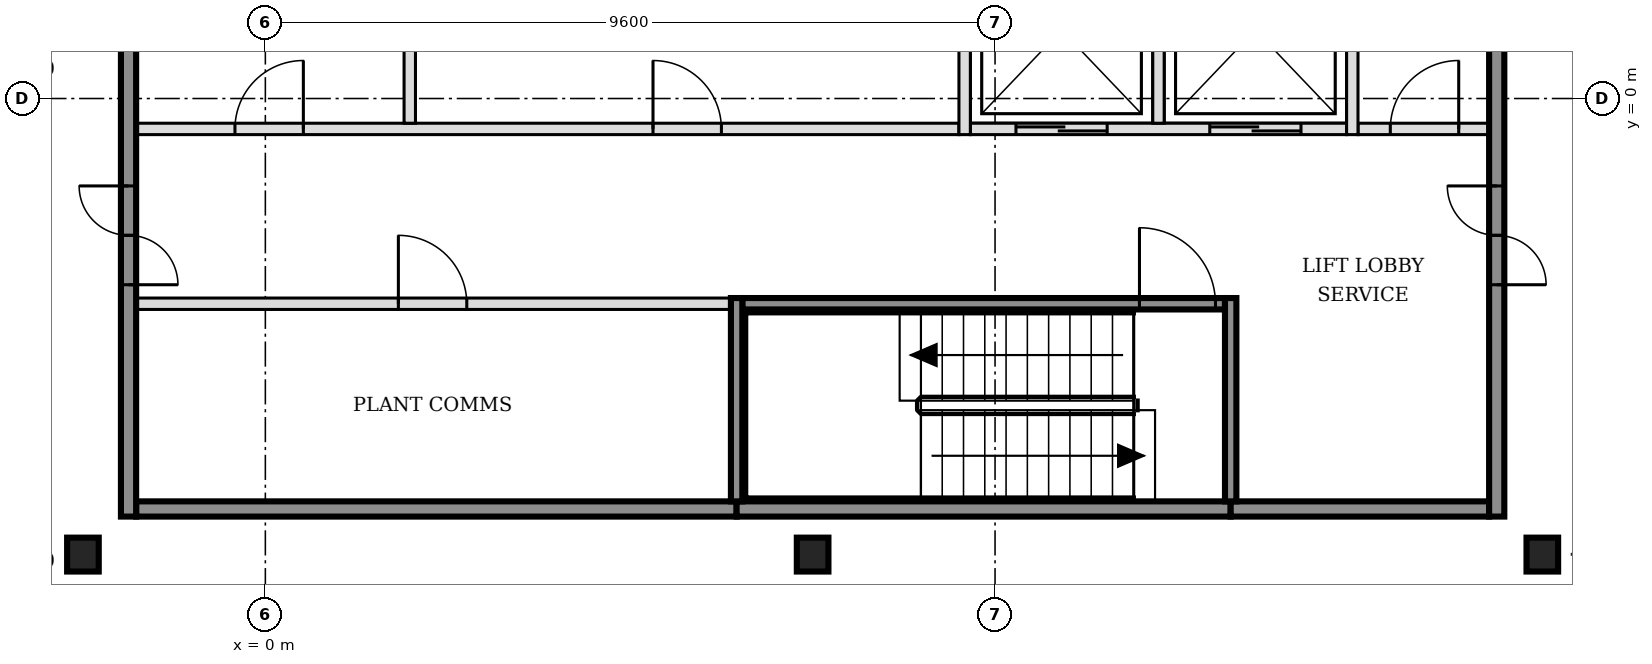
"""IFC4 building model, lengths in metres.
Left out: names, types, materials, properties, quantities, classifications, styles, units other than length and angle.
Written with IfcOpenShell. Run it as: python <this file> out.ifc"""

import sys

from ifc_helpers import new_model, si_unit, direction, frame, frame_2d, origin, origin_2d, place, context, subcontext, project, spatial, rectangle, i_section, extrude, element, fill, save


model = new_model("IFC4")
c1 = context("Model", 3, precision=1e-05, world=origin(), true_north=direction((0.0, 1.0)))
c2 = subcontext(c1, "Body", "Model", "MODEL_VIEW")
j1 = project(units=[si_unit("LENGTHUNIT", "METRE"), si_unit("PLANEANGLEUNIT", "RADIAN")], contexts=[c1])
p1 = place(None, origin())
s1 = spatial("IfcSite", under=j1, at=p1, CompositionType="ELEMENT")
p2 = place(p1, origin())
s2 = spatial("IfcBuilding", under=s1, at=p2, CompositionType="ELEMENT")
p3 = place(p2, frame((0.0, 0.0, 154.2)))
s3 = spatial("IfcBuildingStorey", under=s2, at=p3, CompositionType="ELEMENT", Elevation=154.2)
for number, where, z_axis, x_axis in (
    (1, (-2.4, -6.0, -0.15), (0.0, 0.0, 1.0), (1.0, 0.0, 0.0)),
    (2, (7.2, -6.0, -0.15), (0.0, 0.0, 1.0), (1.0, 0.0, 0.0)),
    (3, (16.8, -6.0, -0.15), (0.0, 0.0, 1.0), (1.0, 0.0, 0.0)),
):
    element("IfcColumn", number, at=place(p3, frame(where, z_axis=z_axis, x_axis=x_axis)), inside=s3, PredefinedType="COLUMN", context=c2, shape_type="SweptSolid", body=[
        extrude(i_section(OverallWidth=0.416, OverallDepth=0.446, WebThickness=0.039, FlangeThickness=0.063, FilletRadius=0.015, at=origin_2d()), origin(), (0.0, 0.0, 1.0), 3.6),
    ])
p4 = place(p3, frame((-1.7, -5.4, 0.0), z_axis=(0.0, 0.0, 1.0), x_axis=(1.0, 0.0, 0.0)))
e4 = element("IfcWall", 4, at=p4, inside=s3, PredefinedType="SOLIDWALL", context=c2, shape_type="SweptSolid", body=[
    extrude(rectangle(XDim=7.9, YDim=0.2, at=frame_2d((3.95, 0.0))), origin(), (0.0, 0.0, 1.0), 3.45),
])
p5 = place(p3, frame((6.2, -5.4, 0.0), z_axis=(0.0, 0.0, 1.0), x_axis=(1.0, 0.0, 0.0)))
e5 = element("IfcWall", 5, at=p5, inside=s3, PredefinedType="SOLIDWALL", context=c2, shape_type="SweptSolid", body=[
    extrude(rectangle(XDim=6.5, YDim=0.2, at=frame_2d((3.25, 0.0))), origin(), (0.0, 0.0, 1.0), 3.45),
])
p6 = place(p3, frame((12.7, -5.4, 0.0), z_axis=(0.0, 0.0, 1.0), x_axis=(1.0, 0.0, 0.0)))
e6 = element("IfcWall", 6, at=p6, inside=s3, PredefinedType="SOLIDWALL", context=c2, shape_type="SweptSolid", body=[
    extrude(rectangle(XDim=3.4, YDim=0.2, at=frame_2d((1.7, 0.0))), origin(), (0.0, 0.0, 1.0), 3.45),
])
p7 = place(p3, frame((-1.7, -2.7, 0.0), z_axis=(0.0, 0.0, 1.0), x_axis=(1.0, 0.0, 0.0)))
e7 = element("IfcWall", 7, at=p7, inside=s3, PredefinedType="PARTITIONING", context=c2, shape_type="SweptSolid", body=[
    extrude(rectangle(XDim=7.825, YDim=0.15, at=frame_2d((3.913, 0.0))), origin(), (0.0, 0.0, 1.0), 3.45),
])
p8 = place(p7, frame((3.45, 0.0, 0.0)))
e8 = element("IfcOpeningElement", 8, at=p8, cuts=e7, PredefinedType="OPENING", context=c2, shape_type="SweptSolid", body=[
    extrude(rectangle(XDim=0.9, YDim=2.1, at=frame_2d((0.45, 1.05))), frame((0.0, 0.085, 0.0), z_axis=(0.0, -1.0, 0.0), x_axis=(1.0, 0.0, 0.0)), (0.0, 0.0, 1.0), 0.17),
])
p9 = place(p3, frame((6.275, -2.7, 0.0), z_axis=(0.0, 0.0, 1.0), x_axis=(1.0, 0.0, 0.0)))
e9 = element("IfcWall", 9, at=p9, inside=s3, PredefinedType="SOLIDWALL", context=c2, shape_type="SweptSolid", body=[
    extrude(rectangle(XDim=6.35, YDim=0.15, at=frame_2d((3.175, 0.0))), origin(), (0.0, 0.0, 1.0), 3.45),
])
p10 = place(p9, frame((5.225, 0.0, 0.0)))
e10 = element("IfcOpeningElement", 10, at=p10, cuts=e9, PredefinedType="OPENING", context=c2, shape_type="SweptSolid", body=[
    extrude(rectangle(XDim=1.0, YDim=2.1, at=frame_2d((0.5, 1.05))), frame((0.0, 0.085, 0.0), z_axis=(0.0, -1.0, 0.0), x_axis=(1.0, 0.0, 0.0)), (0.0, 0.0, 1.0), 0.17),
])
p11 = place(p3, frame((-1.7, -0.4, 0.0), z_axis=(0.0, 0.0, 1.0), x_axis=(1.0, 0.0, 0.0)))
e11 = element("IfcWall", 11, at=p11, inside=s3, PredefinedType="PARTITIONING", context=c2, shape_type="SweptSolid", body=[
    extrude(rectangle(XDim=10.825, YDim=0.15, at=frame_2d((5.413, 0.0))), origin(), (0.0, 0.0, 1.0), 3.45),
])
p12 = place(p11, frame((1.3, 0.0, 0.0)))
e12 = element("IfcOpeningElement", 12, at=p12, cuts=e11, PredefinedType="OPENING", context=c2, shape_type="SweptSolid", body=[
    extrude(rectangle(XDim=0.9, YDim=2.1, at=frame_2d((0.45, 1.05))), frame((0.0, 0.085, 0.0), z_axis=(0.0, -1.0, 0.0), x_axis=(1.0, 0.0, 0.0)), (0.0, 0.0, 1.0), 0.17),
])
p13 = place(p11, frame((6.8, 0.0, 0.0)))
e13 = element("IfcOpeningElement", 13, at=p13, cuts=e11, PredefinedType="OPENING", context=c2, shape_type="SweptSolid", body=[
    extrude(rectangle(XDim=0.9, YDim=2.1, at=frame_2d((0.45, 1.05))), frame((0.0, 0.085, 0.0), z_axis=(0.0, -1.0, 0.0), x_axis=(1.0, 0.0, 0.0)), (0.0, 0.0, 1.0), 0.17),
])
p14 = place(p3, frame((9.275, -0.4, 0.0), z_axis=(0.0, 0.0, 1.0), x_axis=(1.0, 0.0, 0.0)))
e14 = element("IfcWall", 14, at=p14, inside=s3, PredefinedType="SOLIDWALL", context=c2, shape_type="SweptSolid", body=[
    extrude(rectangle(XDim=4.95, YDim=0.15, at=frame_2d((2.475, 0.0))), origin(), (0.0, 0.0, 1.0), 3.45),
])
p15 = place(p14, frame((0.6, 0.0, 0.0)))
e15 = element("IfcOpeningElement", 15, at=p15, cuts=e14, PredefinedType="OPENING", context=c2, shape_type="SweptSolid", body=[
    extrude(rectangle(XDim=1.2, YDim=2.1, at=frame_2d((0.6, 1.05))), frame((0.0, 0.085, 0.0), z_axis=(0.0, -1.0, 0.0), x_axis=(1.0, 0.0, 0.0)), (0.0, 0.0, 1.0), 0.17),
])
p16 = place(p14, frame((3.15, 0.0, 0.0)))
e16 = element("IfcOpeningElement", 16, at=p16, cuts=e14, PredefinedType="OPENING", context=c2, shape_type="SweptSolid", body=[
    extrude(rectangle(XDim=1.2, YDim=2.1, at=frame_2d((0.6, 1.05))), frame((0.0, 0.085, 0.0), z_axis=(0.0, -1.0, 0.0), x_axis=(1.0, 0.0, 0.0)), (0.0, 0.0, 1.0), 0.17),
])
p17 = place(p3, frame((14.375, -0.4, 0.0), z_axis=(0.0, 0.0, 1.0), x_axis=(1.0, 0.0, 0.0)))
e17 = element("IfcWall", 17, at=p17, inside=s3, PredefinedType="PARTITIONING", context=c2, shape_type="SweptSolid", body=[
    extrude(rectangle(XDim=1.725, YDim=0.15, at=frame_2d((0.863, 0.0))), origin(), (0.0, 0.0, 1.0), 3.45),
])
p18 = place(p17, frame((0.425, 0.0, 0.0)))
e18 = element("IfcOpeningElement", 18, at=p18, cuts=e17, PredefinedType="OPENING", context=c2, shape_type="SweptSolid", body=[
    extrude(rectangle(XDim=0.9, YDim=2.1, at=frame_2d((0.45, 1.05))), frame((0.0, 0.085, 0.0), z_axis=(0.0, -1.0, 0.0), x_axis=(1.0, 0.0, 0.0)), (0.0, 0.0, 1.0), 0.17),
])
p19 = place(p3, frame((-1.8, -5.5, 0.0), z_axis=(0.0, 0.0, 1.0), x_axis=(0.0, 1.0, 0.0)))
e19 = element("IfcWall", 19, at=p19, inside=s3, PredefinedType="SOLIDWALL", context=c2, shape_type="SweptSolid", body=[
    extrude(rectangle(XDim=15.8, YDim=0.2, at=frame_2d((7.9, 0.0))), origin(), (0.0, 0.0, 1.0), 3.45),
])
p20 = place(p19, frame((3.05, 0.0, 0.0)))
e20 = element("IfcOpeningElement", 20, at=p20, cuts=e19, PredefinedType="OPENING", context=c2, shape_type="SweptSolid", body=[
    extrude(rectangle(XDim=1.3, YDim=2.1, at=frame_2d((0.65, 1.05))), frame((0.0, 0.11, 0.0), z_axis=(0.0, -1.0, 0.0), x_axis=(1.0, 0.0, 0.0)), (0.0, 0.0, 1.0), 0.22),
])
p21 = place(p19, frame((11.45, 0.0, 0.0)))
e21 = element("IfcOpeningElement", 21, at=p21, cuts=e19, PredefinedType="OPENING", context=c2, shape_type="SweptSolid", body=[
    extrude(rectangle(XDim=1.3, YDim=2.1, at=frame_2d((0.65, 1.05))), frame((0.0, 0.11, 0.0), z_axis=(0.0, -1.0, 0.0), x_axis=(1.0, 0.0, 0.0)), (0.0, 0.0, 1.0), 0.22),
])
p22 = place(p3, frame((1.9, -0.325, 0.0), z_axis=(0.0, 0.0, 1.0), x_axis=(0.0, 1.0, 0.0)))
e22 = element("IfcWall", 22, at=p22, inside=s3, PredefinedType="PARTITIONING", context=c2, shape_type="SweptSolid", body=[
    extrude(rectangle(XDim=2.45, YDim=0.15, at=frame_2d((1.225, 0.0))), origin(), (0.0, 0.0, 1.0), 3.45),
])
p23 = place(p3, frame((6.2, -5.3, 0.0), z_axis=(0.0, 0.0, 1.0), x_axis=(0.0, 1.0, 0.0)))
e23 = element("IfcWall", 23, at=p23, inside=s3, PredefinedType="SOLIDWALL", context=c2, shape_type="SweptSolid", body=[
    extrude(rectangle(XDim=2.675, YDim=0.15, at=frame_2d((1.337, 0.0))), origin(), (0.0, 0.0, 1.0), 3.45),
])
p24 = place(p3, frame((9.2, -0.475, 0.0), z_axis=(0.0, 0.0, 1.0), x_axis=(0.0, 1.0, 0.0)))
e24 = element("IfcWall", 24, at=p24, inside=s3, PredefinedType="SOLIDWALL", context=c2, shape_type="SweptSolid", body=[
    extrude(rectangle(XDim=2.6, YDim=0.15, at=frame_2d((1.3, 0.0))), origin(), (0.0, 0.0, 1.0), 3.45),
])
p25 = place(p3, frame((11.75, -0.325, 0.0), z_axis=(0.0, 0.0, 1.0), x_axis=(0.0, 1.0, 0.0)))
e25 = element("IfcWall", 25, at=p25, inside=s3, PredefinedType="SOLIDWALL", context=c2, shape_type="SweptSolid", body=[
    extrude(rectangle(XDim=2.45, YDim=0.15, at=frame_2d((1.225, 0.0))), origin(), (0.0, 0.0, 1.0), 3.45),
])
p26 = place(p3, frame((12.7, -5.3, 0.0), z_axis=(0.0, 0.0, 1.0), x_axis=(0.0, 1.0, 0.0)))
e26 = element("IfcWall", 26, at=p26, inside=s3, PredefinedType="SOLIDWALL", context=c2, shape_type="SweptSolid", body=[
    extrude(rectangle(XDim=2.675, YDim=0.15, at=frame_2d((1.337, 0.0))), origin(), (0.0, 0.0, 1.0), 3.45),
])
p27 = place(p3, frame((14.3, -0.475, 0.0), z_axis=(0.0, 0.0, 1.0), x_axis=(0.0, 1.0, 0.0)))
e27 = element("IfcWall", 27, at=p27, inside=s3, PredefinedType="SOLIDWALL", context=c2, shape_type="SweptSolid", body=[
    extrude(rectangle(XDim=2.75, YDim=0.15, at=frame_2d((1.375, 0.0))), origin(), (0.0, 0.0, 1.0), 3.45),
])
p28 = place(p3, frame((16.2, -5.5, 0.0), z_axis=(0.0, 0.0, 1.0), x_axis=(0.0, 1.0, 0.0)))
e28 = element("IfcWall", 28, at=p28, inside=s3, PredefinedType="SOLIDWALL", context=c2, shape_type="SweptSolid", body=[
    extrude(rectangle(XDim=15.8, YDim=0.2, at=frame_2d((7.9, 0.0))), origin(), (0.0, 0.0, 1.0), 3.45),
])
p29 = place(p28, frame((3.05, 0.0, 0.0)))
e29 = element("IfcOpeningElement", 29, at=p29, cuts=e28, PredefinedType="OPENING", context=c2, shape_type="SweptSolid", body=[
    extrude(rectangle(XDim=1.3, YDim=2.1, at=frame_2d((0.65, 1.05))), frame((0.0, 0.11, 0.0), z_axis=(0.0, -1.0, 0.0), x_axis=(1.0, 0.0, 0.0)), (0.0, 0.0, 1.0), 0.22),
])
p30 = place(p28, frame((11.45, 0.0, 0.0)))
e30 = element("IfcOpeningElement", 30, at=p30, cuts=e28, PredefinedType="OPENING", context=c2, shape_type="SweptSolid", body=[
    extrude(rectangle(XDim=1.3, YDim=2.1, at=frame_2d((0.65, 1.05))), frame((0.0, 0.11, 0.0), z_axis=(0.0, -1.0, 0.0), x_axis=(1.0, 0.0, 0.0)), (0.0, 0.0, 1.0), 0.22),
])
p31 = place(p15, origin())
e31 = element("IfcDoor", 31, at=p31, inside=s3, OperationType="DOUBLE_DOOR_SLIDING", PredefinedType="DOOR", context=c2, shape_type="SweptSolid", body=[
    extrude(rectangle(XDim=1.2, YDim=2.1, at=frame_2d((0.6, 1.05))), frame((0.0, 0.025, 0.0), z_axis=(0.0, -1.0, 0.0), x_axis=(1.0, 0.0, 0.0)), (0.0, 0.0, 1.0), 0.05),
])
fill(e15, e31)
p32 = place(p16, origin())
e32 = element("IfcDoor", 32, at=p32, inside=s3, OperationType="DOUBLE_DOOR_SLIDING", PredefinedType="DOOR", context=c2, shape_type="SweptSolid", body=[
    extrude(rectangle(XDim=1.2, YDim=2.1, at=frame_2d((0.6, 1.05))), frame((0.0, 0.025, 0.0), z_axis=(0.0, -1.0, 0.0), x_axis=(1.0, 0.0, 0.0)), (0.0, 0.0, 1.0), 0.05),
])
fill(e16, e32)
p33 = place(p10, origin())
e33 = element("IfcDoor", 33, at=p33, inside=s3, OperationType="SINGLE_SWING_LEFT", PredefinedType="DOOR", context=c2, shape_type="SweptSolid", body=[
    extrude(rectangle(XDim=1.0, YDim=2.1, at=frame_2d((0.5, 1.05))), frame((0.0, 0.025, 0.0), z_axis=(0.0, -1.0, 0.0), x_axis=(1.0, 0.0, 0.0)), (0.0, 0.0, 1.0), 0.05),
])
fill(e10, e33)
p34 = place(p20, origin())
e34 = element("IfcDoor", 34, at=p34, inside=s3, OperationType="DOUBLE_DOOR_SINGLE_SWING", PredefinedType="DOOR", context=c2, shape_type="SweptSolid", body=[
    extrude(rectangle(XDim=1.3, YDim=2.1, at=frame_2d((0.65, 1.05))), frame((0.0, 0.025, 0.0), z_axis=(0.0, -1.0, 0.0), x_axis=(1.0, 0.0, 0.0)), (0.0, 0.0, 1.0), 0.05),
])
fill(e20, e34)
p35 = place(p29, origin())
e35 = element("IfcDoor", 35, at=p35, inside=s3, OperationType="DOUBLE_DOOR_SINGLE_SWING", PredefinedType="DOOR", context=c2, shape_type="SweptSolid", body=[
    extrude(rectangle(XDim=1.3, YDim=2.1, at=frame_2d((0.65, 1.05))), frame((0.0, 0.025, 0.0), z_axis=(0.0, -1.0, 0.0), x_axis=(1.0, 0.0, 0.0)), (0.0, 0.0, 1.0), 0.05),
])
fill(e29, e35)
p36 = place(p18, origin())
e36 = element("IfcDoor", 36, at=p36, inside=s3, OperationType="SINGLE_SWING_RIGHT", PredefinedType="DOOR", context=c2, shape_type="SweptSolid", body=[
    extrude(rectangle(XDim=0.9, YDim=2.1, at=frame_2d((0.45, 1.05))), frame((0.0, 0.025, 0.0), z_axis=(0.0, -1.0, 0.0), x_axis=(1.0, 0.0, 0.0)), (0.0, 0.0, 1.0), 0.05),
])
fill(e18, e36)
p37 = place(p8, origin())
e37 = element("IfcDoor", 37, at=p37, inside=s3, OperationType="SINGLE_SWING_LEFT", PredefinedType="DOOR", context=c2, shape_type="SweptSolid", body=[
    extrude(rectangle(XDim=0.9, YDim=2.1, at=frame_2d((0.45, 1.05))), frame((0.0, 0.025, 0.0), z_axis=(0.0, -1.0, 0.0), x_axis=(1.0, 0.0, 0.0)), (0.0, 0.0, 1.0), 0.05),
])
fill(e8, e37)
p38 = place(p12, origin())
e38 = element("IfcDoor", 38, at=p38, inside=s3, OperationType="SINGLE_SWING_RIGHT", PredefinedType="DOOR", context=c2, shape_type="SweptSolid", body=[
    extrude(rectangle(XDim=0.9, YDim=2.1, at=frame_2d((0.45, 1.05))), frame((0.0, 0.025, 0.0), z_axis=(0.0, -1.0, 0.0), x_axis=(1.0, 0.0, 0.0)), (0.0, 0.0, 1.0), 0.05),
])
fill(e12, e38)
p39 = place(p13, origin())
e39 = element("IfcDoor", 39, at=p39, inside=s3, OperationType="SINGLE_SWING_LEFT", PredefinedType="DOOR", context=c2, shape_type="SweptSolid", body=[
    extrude(rectangle(XDim=0.9, YDim=2.1, at=frame_2d((0.45, 1.05))), frame((0.0, 0.025, 0.0), z_axis=(0.0, -1.0, 0.0), x_axis=(1.0, 0.0, 0.0)), (0.0, 0.0, 1.0), 0.05),
])
fill(e13, e39)
save(model, sys.argv[1])
